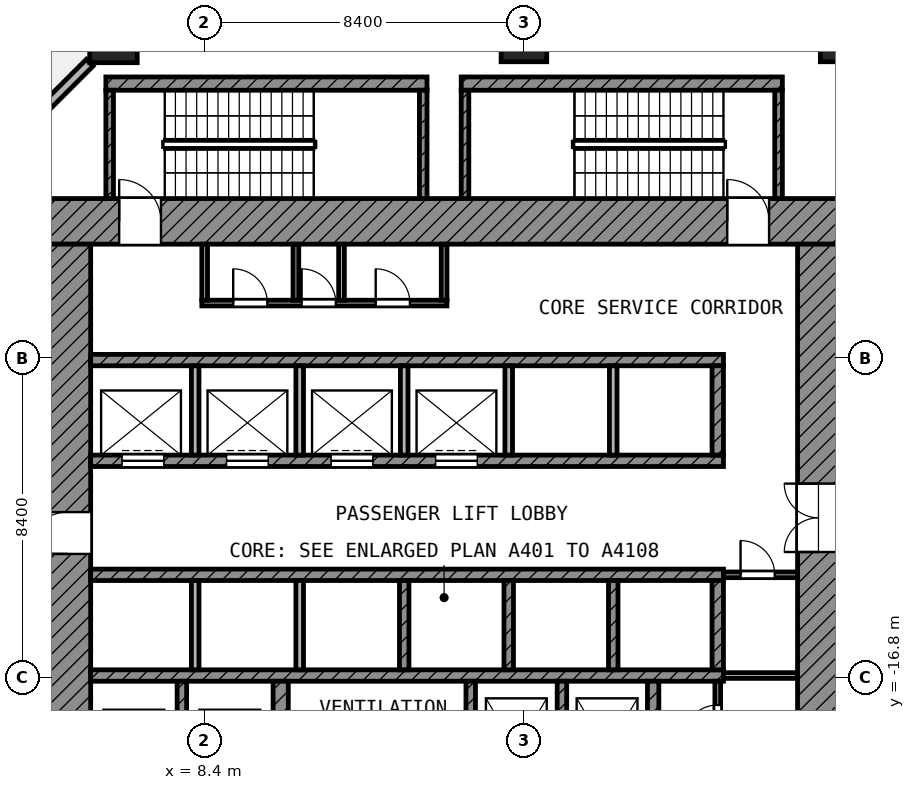
"""IFC4 building model, lengths in metres.
Left out: names, types, materials, properties, quantities, classifications, styles, units other than length and angle.
Written with IfcOpenShell. Run it as: python <this file> out.ifc"""

import sys

from ifc_helpers import new_model, si_unit, direction, frame, frame_2d, origin, origin_2d, place, context, subcontext, project, spatial, rectangle, extrude, element, fill, save


model = new_model("IFC4")
c1 = context("Model", 3, precision=1e-05, world=origin(), true_north=direction((0.0, 1.0)))
c2 = subcontext(c1, "Body", "Model", "MODEL_VIEW")
j1 = project(units=[si_unit("LENGTHUNIT", "METRE"), si_unit("PLANEANGLEUNIT", "RADIAN")], contexts=[c1])
p1 = place(None, origin())
s1 = spatial("IfcSite", under=j1, at=p1, CompositionType="ELEMENT")
p2 = place(p1, origin())
s2 = spatial("IfcBuilding", under=s1, at=p2, CompositionType="ELEMENT")
p3 = place(p2, frame((0.0, 0.0, 34.2)))
s3 = spatial("IfcBuildingStorey", under=s2, at=p3, CompositionType="ELEMENT", Elevation=34.2)
p4 = place(p3, frame((6.0, 0.0, 0.0), z_axis=(0.0, 0.0, 1.0), x_axis=(1.0, 0.0, 0.0)))
e1 = element("IfcColumn", 1, at=p4, inside=s3, PredefinedType="COLUMN", context=c2, shape_type="SweptSolid", body=[
    extrude(rectangle(XDim=1.25, YDim=1.25, at=origin_2d()), origin(), (0.0, 0.0, 1.0), 5.0),
])
for number, where, z_axis, x_axis in (
    (2, (16.8, 0.0, 0.0), (0.0, 0.0, 1.0), (1.0, 0.0, 0.0)),
    (3, (25.2, 0.0, 0.0), (0.0, 0.0, 1.0), (1.0, 0.0, 0.0)),
):
    element("IfcColumn", number, at=place(p3, frame(where, z_axis=z_axis, x_axis=x_axis)), inside=s3, PredefinedType="COLUMN", context=c2, shape_type="SweptSolid", body=[
        extrude(rectangle(XDim=1.2, YDim=1.2, at=origin_2d()), origin(), (0.0, 0.0, 1.0), 5.0),
    ])
p5 = place(p3, frame((5.375, -0.625, 0.0), z_axis=(0.0, 0.0, 1.0), x_axis=(-0.707106781187, -0.707106781187, 0.0)))
e4 = element("IfcWall", 4, at=p5, inside=s3, PredefinedType="SOLIDWALL", context=c2, shape_type="SweptSolid", body=[
    extrude(rectangle(XDim=6.718, YDim=0.25, at=frame_2d((3.359, 0.0))), origin(), (0.0, 0.0, 1.0), 3.08),
])
p6 = place(p3, frame((4.2, -4.8, 0.0), z_axis=(0.0, 0.0, 1.0), x_axis=(1.0, 0.0, 0.0)))
e5 = element("IfcWall", 5, at=p6, inside=s3, PredefinedType="SHEAR", context=c2, shape_type="SweptSolid", body=[
    extrude(rectangle(XDim=20.9, YDim=1.2, at=frame_2d((10.45, 0.0))), origin(), (0.0, 0.0, 1.0), 4.58),
])
p7 = place(p6, frame((1.95, 0.0, 0.0)))
e6 = element("IfcOpeningElement", 6, at=p7, cuts=e5, PredefinedType="OPENING", context=c2, shape_type="SweptSolid", body=[
    extrude(rectangle(XDim=1.1, YDim=2.1, at=frame_2d((0.55, 1.05))), frame((0.0, 0.61, 0.0), z_axis=(0.0, -1.0, 0.0), x_axis=(1.0, 0.0, 0.0)), (0.0, 0.0, 1.0), 1.22),
])
p8 = place(p6, frame((17.95, 0.0, 0.0)))
e7 = element("IfcOpeningElement", 7, at=p8, cuts=e5, PredefinedType="OPENING", context=c2, shape_type="SweptSolid", body=[
    extrude(rectangle(XDim=1.1, YDim=2.1, at=frame_2d((0.55, 1.05))), frame((0.0, 0.61, 0.0), z_axis=(0.0, -1.0, 0.0), x_axis=(1.0, 0.0, 0.0)), (0.0, 0.0, 1.0), 1.22),
])
p9 = place(p3, frame((4.8, -25.1, 0.0), z_axis=(0.0, 0.0, 1.0), x_axis=(0.0, 1.0, 0.0)))
e8 = element("IfcWall", 8, at=p9, inside=s3, PredefinedType="SHEAR", context=c2, shape_type="SweptSolid", body=[
    extrude(rectangle(XDim=19.7, YDim=1.2, at=frame_2d((9.85, 0.0))), origin(), (0.0, 0.0, 1.0), 4.58),
])
p10 = place(p9, frame((11.55, 0.0, 0.0)))
e9 = element("IfcOpeningElement", 9, at=p10, cuts=e8, PredefinedType="OPENING", context=c2, shape_type="SweptSolid", body=[
    extrude(rectangle(XDim=1.1, YDim=2.1, at=frame_2d((0.55, 1.05))), frame((0.0, 0.61, 0.0), z_axis=(0.0, -1.0, 0.0), x_axis=(1.0, 0.0, 0.0)), (0.0, 0.0, 1.0), 1.22),
])
p11 = place(p9, frame((2.25, 0.0, 0.0)))
e10 = element("IfcOpeningElement", 10, at=p11, cuts=e8, PredefinedType="OPENING", context=c2, shape_type="SweptSolid", body=[
    extrude(rectangle(XDim=1.1, YDim=2.1, at=frame_2d((0.55, 1.05))), frame((0.0, 0.61, 0.0), z_axis=(0.0, -1.0, 0.0), x_axis=(1.0, 0.0, 0.0)), (0.0, 0.0, 1.0), 1.22),
])
p12 = place(p3, frame((24.55, -24.0, 0.0), z_axis=(0.0, 0.0, 1.0), x_axis=(0.0, 1.0, 0.0)))
e11 = element("IfcWall", 11, at=p12, inside=s3, PredefinedType="SHEAR", context=c2, shape_type="SweptSolid", body=[
    extrude(rectangle(XDim=18.6, YDim=1.1, at=frame_2d((9.3, 0.0))), origin(), (0.0, 0.0, 1.0), 4.58),
])
p13 = place(p12, frame((10.5, 0.0, 0.0)))
e12 = element("IfcOpeningElement", 12, at=p13, cuts=e11, PredefinedType="OPENING", context=c2, shape_type="SweptSolid", body=[
    extrude(rectangle(XDim=1.8, YDim=2.1, at=frame_2d((0.9, 1.05))), frame((0.0, 0.56, 0.0), z_axis=(0.0, -1.0, 0.0), x_axis=(1.0, 0.0, 0.0)), (0.0, 0.0, 1.0), 1.12),
])
p14 = place(p3, frame((5.4, -8.45, 0.0), z_axis=(0.0, 0.0, 1.0), x_axis=(1.0, 0.0, 0.0)))
e13 = element("IfcWall", 13, at=p14, inside=s3, PredefinedType="SHEAR", context=c2, shape_type="SweptSolid", body=[
    extrude(rectangle(XDim=16.65, YDim=0.3, at=frame_2d((8.325, 0.0))), origin(), (0.0, 0.0, 1.0), 4.58),
])
p15 = place(p3, frame((5.4, -11.1, 0.0), z_axis=(0.0, 0.0, 1.0), x_axis=(1.0, 0.0, 0.0)))
e14 = element("IfcWall", 14, at=p15, inside=s3, PredefinedType="SHEAR", context=c2, shape_type="SweptSolid", body=[
    extrude(rectangle(XDim=16.65, YDim=0.3, at=frame_2d((8.325, 0.0))), origin(), (0.0, 0.0, 1.0), 4.58),
])
p16 = place(p15, frame((0.825, 0.0, 0.0)))
e15 = element("IfcOpeningElement", 15, at=p16, cuts=e14, PredefinedType="OPENING", context=c2, shape_type="SweptSolid", body=[
    extrude(rectangle(XDim=1.1, YDim=2.1, at=frame_2d((0.55, 1.05))), frame((0.0, 0.16, 0.0), z_axis=(0.0, -1.0, 0.0), x_axis=(1.0, 0.0, 0.0)), (0.0, 0.0, 1.0), 0.32),
])
p17 = place(p15, frame((3.575, 0.0, 0.0)))
e16 = element("IfcOpeningElement", 16, at=p17, cuts=e14, PredefinedType="OPENING", context=c2, shape_type="SweptSolid", body=[
    extrude(rectangle(XDim=1.1, YDim=2.1, at=frame_2d((0.55, 1.05))), frame((0.0, 0.16, 0.0), z_axis=(0.0, -1.0, 0.0), x_axis=(1.0, 0.0, 0.0)), (0.0, 0.0, 1.0), 0.32),
])
p18 = place(p15, frame((6.325, 0.0, 0.0)))
e17 = element("IfcOpeningElement", 17, at=p18, cuts=e14, PredefinedType="OPENING", context=c2, shape_type="SweptSolid", body=[
    extrude(rectangle(XDim=1.1, YDim=2.1, at=frame_2d((0.55, 1.05))), frame((0.0, 0.16, 0.0), z_axis=(0.0, -1.0, 0.0), x_axis=(1.0, 0.0, 0.0)), (0.0, 0.0, 1.0), 0.32),
])
p19 = place(p15, frame((9.075, 0.0, 0.0)))
e18 = element("IfcOpeningElement", 18, at=p19, cuts=e14, PredefinedType="OPENING", context=c2, shape_type="SweptSolid", body=[
    extrude(rectangle(XDim=1.1, YDim=2.1, at=frame_2d((0.55, 1.05))), frame((0.0, 0.16, 0.0), z_axis=(0.0, -1.0, 0.0), x_axis=(1.0, 0.0, 0.0)), (0.0, 0.0, 1.0), 0.32),
])
for number, where, z_axis, x_axis in (
    (19, (5.4, -14.1, 0.0), (0.0, 0.0, 1.0), (1.0, 0.0, 0.0)),
    (20, (5.4, -16.75, 0.0), (0.0, 0.0, 1.0), (1.0, 0.0, 0.0)),
):
    element("IfcWall", number, at=place(p3, frame(where, z_axis=z_axis, x_axis=x_axis)), inside=s3, PredefinedType="SHEAR", context=c2, shape_type="SweptSolid", body=[
        extrude(rectangle(XDim=16.65, YDim=0.3, at=frame_2d((8.325, 0.0))), origin(), (0.0, 0.0, 1.0), 4.58),
    ])
p20 = place(p3, frame((10.4, -20.05, 0.0), z_axis=(0.0, 0.0, 1.0), x_axis=(0.0, 1.0, 0.0)))
e21 = element("IfcWall", 21, at=p20, inside=s3, PredefinedType="SHEAR", context=c2, shape_type="SweptSolid", body=[
    extrude(rectangle(XDim=3.15, YDim=0.4, at=frame_2d((1.575, 0.0))), origin(), (0.0, 0.0, 1.0), 4.58),
])
p21 = place(p3, frame((20.2, -20.35, 0.0), z_axis=(0.0, 0.0, 1.0), x_axis=(0.0, 1.0, 0.0)))
e22 = element("IfcWall", 22, at=p21, inside=s3, PredefinedType="SHEAR", context=c2, shape_type="SweptSolid", body=[
    extrude(rectangle(XDim=3.45, YDim=0.3, at=frame_2d((1.725, 0.0))), origin(), (0.0, 0.0, 1.0), 4.58),
])
p22 = place(p3, frame((21.9, -10.95, 0.0), z_axis=(0.0, 0.0, 1.0), x_axis=(0.0, 1.0, 0.0)))
e23 = element("IfcWall", 23, at=p22, inside=s3, PredefinedType="SHEAR", context=c2, shape_type="SweptSolid", body=[
    extrude(rectangle(XDim=2.35, YDim=0.3, at=frame_2d((1.175, 0.0))), origin(), (0.0, 0.0, 1.0), 4.58),
])
p23 = place(p3, frame((21.9, -16.6, 0.0), z_axis=(0.0, 0.0, 1.0), x_axis=(0.0, 1.0, 0.0)))
e24 = element("IfcWall", 24, at=p23, inside=s3, PredefinedType="SHEAR", context=c2, shape_type="SweptSolid", body=[
    extrude(rectangle(XDim=2.35, YDim=0.3, at=frame_2d((1.175, 0.0))), origin(), (0.0, 0.0, 1.0), 4.58),
])
for number, where, z_axis, x_axis in (
    (25, (7.8, -20.05, 0.0), (0.0, 0.0, 1.0), (0.0, 1.0, 0.0)),
    (26, (15.4, -20.05, 0.0), (0.0, 0.0, 1.0), (0.0, 1.0, 0.0)),
    (27, (17.8, -20.05, 0.0), (0.0, 0.0, 1.0), (0.0, 1.0, 0.0)),
):
    element("IfcWall", number, at=place(p3, frame(where, z_axis=z_axis, x_axis=x_axis)), inside=s3, PredefinedType="SHEAR", context=c2, shape_type="SweptSolid", body=[
        extrude(rectangle(XDim=3.15, YDim=0.25, at=frame_2d((1.575, 0.0))), origin(), (0.0, 0.0, 1.0), 4.58),
    ])
for number, where, z_axis, x_axis in (
    (28, (8.15, -10.95, 0.0), (0.0, 0.0, 1.0), (0.0, 1.0, 0.0)),
    (29, (10.9, -10.95, 0.0), (0.0, 0.0, 1.0), (0.0, 1.0, 0.0)),
    (30, (13.65, -10.95, 0.0), (0.0, 0.0, 1.0), (0.0, 1.0, 0.0)),
    (31, (16.4, -10.95, 0.0), (0.0, 0.0, 1.0), (0.0, 1.0, 0.0)),
    (32, (19.15, -10.95, 0.0), (0.0, 0.0, 1.0), (0.0, 1.0, 0.0)),
):
    element("IfcWall", number, at=place(p3, frame(where, z_axis=z_axis, x_axis=x_axis)), inside=s3, PredefinedType="PARTITIONING", context=c2, shape_type="SweptSolid", body=[
        extrude(rectangle(XDim=2.35, YDim=0.2, at=frame_2d((1.175, 0.0))), origin(), (0.0, 0.0, 1.0), 4.58),
    ])
for number, where, z_axis, x_axis in (
    (33, (8.15, -16.6, 0.0), (0.0, 0.0, 1.0), (0.0, 1.0, 0.0)),
    (34, (10.9, -16.6, 0.0), (0.0, 0.0, 1.0), (0.0, 1.0, 0.0)),
):
    element("IfcWall", number, at=place(p3, frame(where, z_axis=z_axis, x_axis=x_axis)), inside=s3, PredefinedType="PARTITIONING", context=c2, shape_type="SweptSolid", body=[
        extrude(rectangle(XDim=2.35, YDim=0.2, at=frame_2d((1.175, 0.0))), origin(), (0.0, 0.0, 1.0), 4.58),
    ])
for number, where, z_axis, x_axis in (
    (35, (13.65, -16.6, 0.0), (0.0, 0.0, 1.0), (0.0, 1.0, 0.0)),
    (36, (16.4, -16.6, 0.0), (0.0, 0.0, 1.0), (0.0, 1.0, 0.0)),
    (37, (19.15, -16.6, 0.0), (0.0, 0.0, 1.0), (0.0, 1.0, 0.0)),
):
    element("IfcWall", number, at=place(p3, frame(where, z_axis=z_axis, x_axis=x_axis)), inside=s3, PredefinedType="SHEAR", context=c2, shape_type="SweptSolid", body=[
        extrude(rectangle(XDim=2.35, YDim=0.25, at=frame_2d((1.175, 0.0))), origin(), (0.0, 0.0, 1.0), 4.58),
    ])
p24 = place(p3, frame((21.9, -19.05, 0.0), z_axis=(0.0, 0.0, 1.0), x_axis=(0.0, 1.0, 0.0)))
e38 = element("IfcWall", 38, at=p24, inside=s3, PredefinedType="PARTITIONING", context=c2, shape_type="SweptSolid", body=[
    extrude(rectangle(XDim=2.15, YDim=0.15, at=frame_2d((1.075, 0.0))), origin(), (0.0, 0.0, 1.0), 4.58),
])
p25 = place(p24, frame((0.625, 0.0, 0.0)))
e39 = element("IfcOpeningElement", 39, at=p25, cuts=e38, PredefinedType="OPENING", context=c2, shape_type="SweptSolid", body=[
    extrude(rectangle(XDim=0.9, YDim=2.1, at=frame_2d((0.45, 1.05))), frame((0.0, 0.085, 0.0), z_axis=(0.0, -1.0, 0.0), x_axis=(1.0, 0.0, 0.0)), (0.0, 0.0, 1.0), 0.17),
])
p26 = place(p3, frame((22.05, -16.75, 0.0), z_axis=(0.0, 0.0, 1.0), x_axis=(1.0, 0.0, 0.0)))
e40 = element("IfcWall", 40, at=p26, inside=s3, PredefinedType="PARTITIONING", context=c2, shape_type="SweptSolid", body=[
    extrude(rectangle(XDim=1.95, YDim=0.15, at=frame_2d((0.975, 0.0))), origin(), (0.0, 0.0, 1.0), 4.58),
])
p27 = place(p3, frame((22.05, -14.1, 0.0), z_axis=(0.0, 0.0, 1.0), x_axis=(1.0, 0.0, 0.0)))
e41 = element("IfcWall", 41, at=p27, inside=s3, PredefinedType="PARTITIONING", context=c2, shape_type="SweptSolid", body=[
    extrude(rectangle(XDim=1.95, YDim=0.15, at=frame_2d((0.975, 0.0))), origin(), (0.0, 0.0, 1.0), 4.58),
])
p28 = place(p27, frame((0.45, 0.0, 0.0)))
e42 = element("IfcOpeningElement", 42, at=p28, cuts=e41, PredefinedType="OPENING", context=c2, shape_type="SweptSolid", body=[
    extrude(rectangle(XDim=0.9, YDim=2.1, at=frame_2d((0.45, 1.05))), frame((0.0, 0.085, 0.0), z_axis=(0.0, -1.0, 0.0), x_axis=(1.0, 0.0, 0.0)), (0.0, 0.0, 1.0), 0.17),
])
p29 = place(p3, frame((8.325, -6.95, 0.0), z_axis=(0.0, 0.0, 1.0), x_axis=(1.0, 0.0, 0.0)))
e43 = element("IfcWall", 43, at=p29, inside=s3, PredefinedType="PARTITIONING", context=c2, shape_type="SweptSolid", body=[
    extrude(rectangle(XDim=6.45, YDim=0.15, at=frame_2d((3.225, 0.0))), origin(), (0.0, 0.0, 1.0), 4.58),
])
p30 = place(p29, frame((0.825, 0.0, 0.0)))
e44 = element("IfcOpeningElement", 44, at=p30, cuts=e43, PredefinedType="OPENING", context=c2, shape_type="SweptSolid", body=[
    extrude(rectangle(XDim=0.9, YDim=2.1, at=frame_2d((0.45, 1.05))), frame((0.0, 0.085, 0.0), z_axis=(0.0, -1.0, 0.0), x_axis=(1.0, 0.0, 0.0)), (0.0, 0.0, 1.0), 0.17),
])
p31 = place(p29, frame((2.625, 0.0, 0.0)))
e45 = element("IfcOpeningElement", 45, at=p31, cuts=e43, PredefinedType="OPENING", context=c2, shape_type="SweptSolid", body=[
    extrude(rectangle(XDim=0.9, YDim=2.1, at=frame_2d((0.45, 1.05))), frame((0.0, 0.085, 0.0), z_axis=(0.0, -1.0, 0.0), x_axis=(1.0, 0.0, 0.0)), (0.0, 0.0, 1.0), 0.17),
])
p32 = place(p29, frame((4.575, 0.0, 0.0)))
e46 = element("IfcOpeningElement", 46, at=p32, cuts=e43, PredefinedType="OPENING", context=c2, shape_type="SweptSolid", body=[
    extrude(rectangle(XDim=0.9, YDim=2.1, at=frame_2d((0.45, 1.05))), frame((0.0, 0.085, 0.0), z_axis=(0.0, -1.0, 0.0), x_axis=(1.0, 0.0, 0.0)), (0.0, 0.0, 1.0), 0.17),
])
for number, where, z_axis, x_axis in (
    (47, (8.4, -6.875, 0.0), (0.0, 0.0, 1.0), (0.0, 1.0, 0.0)),
    (48, (10.8, -6.875, 0.0), (0.0, 0.0, 1.0), (0.0, 1.0, 0.0)),
    (49, (12.0, -6.875, 0.0), (0.0, 0.0, 1.0), (0.0, 1.0, 0.0)),
    (50, (14.7, -6.875, 0.0), (0.0, 0.0, 1.0), (0.0, 1.0, 0.0)),
):
    element("IfcWall", number, at=place(p3, frame(where, z_axis=z_axis, x_axis=x_axis)), inside=s3, PredefinedType="PARTITIONING", context=c2, shape_type="SweptSolid", body=[
        extrude(rectangle(XDim=1.475, YDim=0.15, at=frame_2d((0.738, 0.0))), origin(), (0.0, 0.0, 1.0), 4.58),
    ])
p33 = place(p3, frame((5.8, -1.175, 0.0), z_axis=(0.0, 0.0, 1.0), x_axis=(1.0, 0.0, 0.0)))
e51 = element("IfcWall", 51, at=p33, inside=s3, PredefinedType="SHEAR", context=c2, shape_type="SweptSolid", body=[
    extrude(rectangle(XDim=8.45, YDim=0.35, at=frame_2d((4.225, 0.0))), origin(), (0.0, 0.0, 1.0), 4.58),
])
for number, where, z_axis, x_axis in (
    (52, (5.9, -4.2, 0.0), (0.0, 0.0, 1.0), (0.0, 1.0, 0.0)),
    (53, (14.15, -4.2, 0.0), (0.0, 0.0, 1.0), (0.0, 1.0, 0.0)),
):
    element("IfcWall", number, at=place(p3, frame(where, z_axis=z_axis, x_axis=x_axis)), inside=s3, PredefinedType="SHEAR", context=c2, shape_type="SweptSolid", body=[
        extrude(rectangle(XDim=2.85, YDim=0.2, at=frame_2d((1.425, 0.0))), origin(), (0.0, 0.0, 1.0), 4.58),
    ])
p34 = place(p3, frame((15.15, -1.175, 0.0), z_axis=(0.0, 0.0, 1.0), x_axis=(1.0, 0.0, 0.0)))
e54 = element("IfcWall", 54, at=p34, inside=s3, PredefinedType="SHEAR", context=c2, shape_type="SweptSolid", body=[
    extrude(rectangle(XDim=8.45, YDim=0.35, at=frame_2d((4.225, 0.0))), origin(), (0.0, 0.0, 1.0), 4.58),
])
for number, where, z_axis, x_axis in (
    (55, (15.25, -4.2, 0.0), (0.0, 0.0, 1.0), (0.0, 1.0, 0.0)),
    (56, (23.5, -4.2, 0.0), (0.0, 0.0, 1.0), (0.0, 1.0, 0.0)),
):
    element("IfcWall", number, at=place(p3, frame(where, z_axis=z_axis, x_axis=x_axis)), inside=s3, PredefinedType="SHEAR", context=c2, shape_type="SweptSolid", body=[
        extrude(rectangle(XDim=2.85, YDim=0.2, at=frame_2d((1.425, 0.0))), origin(), (0.0, 0.0, 1.0), 4.58),
    ])
p35 = place(p16, origin())
e57 = element("IfcDoor", 57, at=p35, inside=s3, OperationType="DOUBLE_DOOR_SLIDING", PredefinedType="DOOR", context=c2, shape_type="SweptSolid", body=[
    extrude(rectangle(XDim=1.1, YDim=2.1, at=frame_2d((0.55, 1.05))), frame((0.0, 0.025, 0.0), z_axis=(0.0, -1.0, 0.0), x_axis=(1.0, 0.0, 0.0)), (0.0, 0.0, 1.0), 0.05),
])
fill(e15, e57)
p36 = place(p17, origin())
e58 = element("IfcDoor", 58, at=p36, inside=s3, OperationType="DOUBLE_DOOR_SLIDING", PredefinedType="DOOR", context=c2, shape_type="SweptSolid", body=[
    extrude(rectangle(XDim=1.1, YDim=2.1, at=frame_2d((0.55, 1.05))), frame((0.0, 0.025, 0.0), z_axis=(0.0, -1.0, 0.0), x_axis=(1.0, 0.0, 0.0)), (0.0, 0.0, 1.0), 0.05),
])
fill(e16, e58)
p37 = place(p18, origin())
e59 = element("IfcDoor", 59, at=p37, inside=s3, OperationType="DOUBLE_DOOR_SLIDING", PredefinedType="DOOR", context=c2, shape_type="SweptSolid", body=[
    extrude(rectangle(XDim=1.1, YDim=2.1, at=frame_2d((0.55, 1.05))), frame((0.0, 0.025, 0.0), z_axis=(0.0, -1.0, 0.0), x_axis=(1.0, 0.0, 0.0)), (0.0, 0.0, 1.0), 0.05),
])
fill(e17, e59)
p38 = place(p19, origin())
e60 = element("IfcDoor", 60, at=p38, inside=s3, OperationType="DOUBLE_DOOR_SLIDING", PredefinedType="DOOR", context=c2, shape_type="SweptSolid", body=[
    extrude(rectangle(XDim=1.1, YDim=2.1, at=frame_2d((0.55, 1.05))), frame((0.0, 0.025, 0.0), z_axis=(0.0, -1.0, 0.0), x_axis=(1.0, 0.0, 0.0)), (0.0, 0.0, 1.0), 0.05),
])
fill(e18, e60)
p39 = place(p10, origin())
e61 = element("IfcDoor", 61, at=p39, inside=s3, OperationType="SINGLE_SWING_LEFT", PredefinedType="DOOR", context=c2, shape_type="SweptSolid", body=[
    extrude(rectangle(XDim=1.1, YDim=2.1, at=frame_2d((0.55, 1.05))), frame((0.0, 0.025, 0.0), z_axis=(0.0, -1.0, 0.0), x_axis=(1.0, 0.0, 0.0)), (0.0, 0.0, 1.0), 0.05),
])
fill(e9, e61)
p40 = place(p7, origin())
e62 = element("IfcDoor", 62, at=p40, inside=s3, OperationType="SINGLE_SWING_LEFT", PredefinedType="DOOR", context=c2, shape_type="SweptSolid", body=[
    extrude(rectangle(XDim=1.1, YDim=2.1, at=frame_2d((0.55, 1.05))), frame((0.0, 0.025, 0.0), z_axis=(0.0, -1.0, 0.0), x_axis=(1.0, 0.0, 0.0)), (0.0, 0.0, 1.0), 0.05),
])
fill(e6, e62)
p41 = place(p8, origin())
e63 = element("IfcDoor", 63, at=p41, inside=s3, OperationType="SINGLE_SWING_LEFT", PredefinedType="DOOR", context=c2, shape_type="SweptSolid", body=[
    extrude(rectangle(XDim=1.1, YDim=2.1, at=frame_2d((0.55, 1.05))), frame((0.0, 0.025, 0.0), z_axis=(0.0, -1.0, 0.0), x_axis=(1.0, 0.0, 0.0)), (0.0, 0.0, 1.0), 0.05),
])
fill(e7, e63)
p42 = place(p13, origin())
e64 = element("IfcDoor", 64, at=p42, inside=s3, OperationType="DOUBLE_DOOR_SINGLE_SWING", PredefinedType="DOOR", context=c2, shape_type="SweptSolid", body=[
    extrude(rectangle(XDim=1.8, YDim=2.1, at=frame_2d((0.9, 1.05))), frame((0.0, 0.025, 0.0), z_axis=(0.0, -1.0, 0.0), x_axis=(1.0, 0.0, 0.0)), (0.0, 0.0, 1.0), 0.05),
])
fill(e12, e64)
p43 = place(p30, origin())
e65 = element("IfcDoor", 65, at=p43, inside=s3, OperationType="SINGLE_SWING_LEFT", PredefinedType="DOOR", context=c2, shape_type="SweptSolid", body=[
    extrude(rectangle(XDim=0.9, YDim=2.1, at=frame_2d((0.45, 1.05))), frame((0.0, 0.025, 0.0), z_axis=(0.0, -1.0, 0.0), x_axis=(1.0, 0.0, 0.0)), (0.0, 0.0, 1.0), 0.05),
])
fill(e44, e65)
p44 = place(p31, origin())
e66 = element("IfcDoor", 66, at=p44, inside=s3, OperationType="SINGLE_SWING_LEFT", PredefinedType="DOOR", context=c2, shape_type="SweptSolid", body=[
    extrude(rectangle(XDim=0.9, YDim=2.1, at=frame_2d((0.45, 1.05))), frame((0.0, 0.025, 0.0), z_axis=(0.0, -1.0, 0.0), x_axis=(1.0, 0.0, 0.0)), (0.0, 0.0, 1.0), 0.05),
])
fill(e45, e66)
p45 = place(p32, origin())
e67 = element("IfcDoor", 67, at=p45, inside=s3, OperationType="SINGLE_SWING_LEFT", PredefinedType="DOOR", context=c2, shape_type="SweptSolid", body=[
    extrude(rectangle(XDim=0.9, YDim=2.1, at=frame_2d((0.45, 1.05))), frame((0.0, 0.025, 0.0), z_axis=(0.0, -1.0, 0.0), x_axis=(1.0, 0.0, 0.0)), (0.0, 0.0, 1.0), 0.05),
])
fill(e46, e67)
p46 = place(p28, origin())
e68 = element("IfcDoor", 68, at=p46, inside=s3, OperationType="SINGLE_SWING_LEFT", PredefinedType="DOOR", context=c2, shape_type="SweptSolid", body=[
    extrude(rectangle(XDim=0.9, YDim=2.1, at=frame_2d((0.45, 1.05))), frame((0.0, 0.025, 0.0), z_axis=(0.0, -1.0, 0.0), x_axis=(1.0, 0.0, 0.0)), (0.0, 0.0, 1.0), 0.05),
])
fill(e42, e68)
p47 = place(p25, origin())
e69 = element("IfcDoor", 69, at=p47, inside=s3, OperationType="SINGLE_SWING_LEFT", PredefinedType="DOOR", context=c2, shape_type="SweptSolid", body=[
    extrude(rectangle(XDim=0.9, YDim=2.1, at=frame_2d((0.45, 1.05))), frame((0.0, 0.025, 0.0), z_axis=(0.0, -1.0, 0.0), x_axis=(1.0, 0.0, 0.0)), (0.0, 0.0, 1.0), 0.05),
])
fill(e39, e69)
save(model, sys.argv[1])
